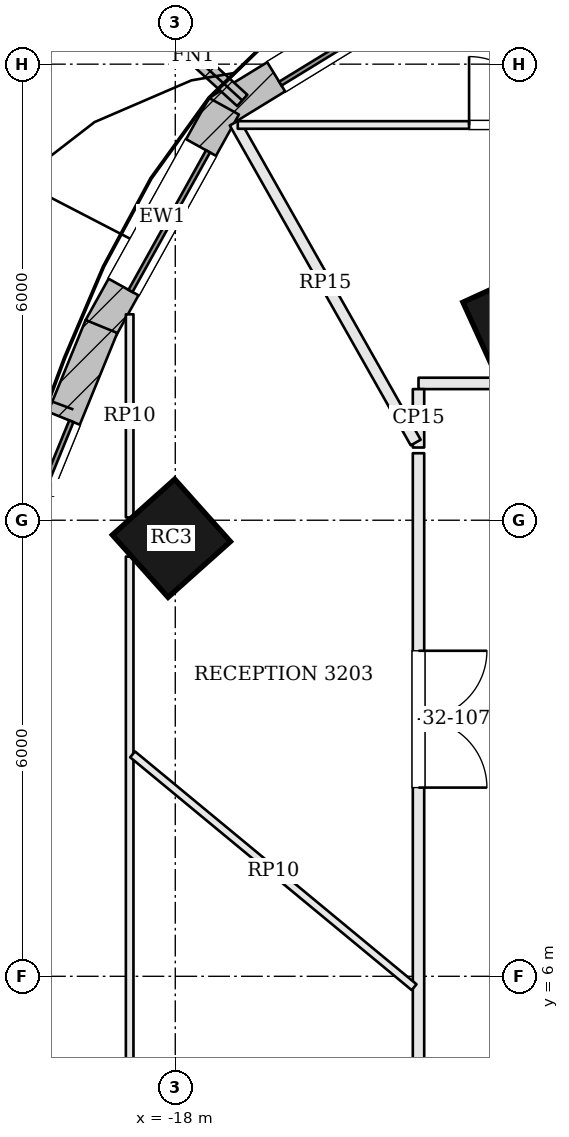
"""IFC4 building model, lengths in metres.
Left out: names, types, materials, properties, quantities, classifications, styles, units other than length and angle.
Written with IfcOpenShell. Run it as: python <this file> out.ifc"""

import sys

from ifc_helpers import new_model, si_unit, direction, frame, frame_2d, origin, origin_2d, place, context, subcontext, project, spatial, rectangle, extrude, element, fill, save


model = new_model("IFC4")
c1 = context("Model", 3, precision=1e-05, world=origin(), true_north=direction((0.0, 1.0)))
c2 = subcontext(c1, "Body", "Model", "MODEL_VIEW")
j1 = project(units=[si_unit("LENGTHUNIT", "METRE"), si_unit("PLANEANGLEUNIT", "RADIAN")], contexts=[c1])
p1 = place(None, origin())
s1 = spatial("IfcSite", under=j1, at=p1, CompositionType="ELEMENT")
p2 = place(p1, origin())
s2 = spatial("IfcBuilding", under=s1, at=p2, CompositionType="ELEMENT")
p3 = place(p2, frame((0.0, 0.0, 134.4)))
s3 = spatial("IfcBuildingStorey", under=s2, at=p3, CompositionType="ELEMENT", Elevation=134.4)
for number, where, z_axis, x_axis in (
    (1, (-13.487, 14.596, 0.0), (0.0, 0.0, 1.0), (-0.91, -0.415, 0.0)),
    (2, (-18.051, 11.763, 0.0), (0.0, 0.0, 1.0), (-0.746, -0.666, 0.0)),
):
    element("IfcColumn", number, at=place(p3, frame(where, z_axis=z_axis, x_axis=x_axis)), inside=s3, PredefinedType="COLUMN", context=c2, shape_type="SweptSolid", body=[
        extrude(rectangle(XDim=1.1, YDim=1.1, at=origin_2d()), origin(), (0.0, 0.0, 1.0), 3.9),
    ])
p4 = place(p3, frame((-14.116, 19.4, 0.0), z_axis=(0.0, 0.0, 1.0), x_axis=(-0.852622865325, -0.522526793117, 0.0)))
e3 = element("IfcWall", 3, at=p4, inside=s3, PredefinedType="SOLIDWALL", context=c2, shape_type="SweptSolid", body=[
    extrude(rectangle(XDim=3.896, YDim=0.45, at=frame_2d((1.948, 0.0))), origin(), (0.0, 0.0, 1.0), 3.7),
])
p5 = place(p4, frame((0.898, 0.0, 0.9)))
e4 = element("IfcOpeningElement", 4, at=p5, cuts=e3, PredefinedType="OPENING", context=c2, shape_type="SweptSolid", body=[
    extrude(rectangle(XDim=2.1, YDim=2.3, at=frame_2d((1.05, 1.15))), frame((0.0, 0.235, 0.0), z_axis=(0.0, -1.0, 0.0), x_axis=(1.0, 0.0, 0.0)), (0.0, 0.0, 1.0), 0.47),
])
p6 = place(p3, frame((-17.359, 17.447, 0.0), z_axis=(0.0, 0.0, 1.0), x_axis=(-0.485618126214, -0.874171056197, 0.0)))
e5 = element("IfcWall", 5, at=p6, inside=s3, PredefinedType="SOLIDWALL", context=c2, shape_type="SweptSolid", body=[
    extrude(rectangle(XDim=3.343, YDim=0.45, at=frame_2d((1.671, 0.0))), origin(), (0.0, 0.0, 1.0), 3.7),
])
p7 = place(p6, frame((0.621, 0.0, 0.9)))
e6 = element("IfcOpeningElement", 6, at=p7, cuts=e5, PredefinedType="OPENING", context=c2, shape_type="SweptSolid", body=[
    extrude(rectangle(XDim=2.1, YDim=2.3, at=frame_2d((1.05, 1.15))), frame((0.0, 0.235, 0.0), z_axis=(0.0, -1.0, 0.0), x_axis=(1.0, 0.0, 0.0)), (0.0, 0.0, 1.0), 0.47),
])
p8 = place(p3, frame((-18.971, 14.549, 0.0), z_axis=(0.0, 0.0, 1.0), x_axis=(-0.378434936431, -0.925627894398, 0.0)))
e7 = element("IfcWall", 7, at=p8, inside=s3, PredefinedType="SOLIDWALL", context=c2, shape_type="SweptSolid", body=[
    extrude(rectangle(XDim=4.708, YDim=0.45, at=frame_2d((2.354, 0.0))), origin(), (0.0, 0.0, 1.0), 3.7),
])
p9 = place(p8, frame((1.304, 0.0, 0.9)))
e8 = element("IfcOpeningElement", 8, at=p9, cuts=e7, PredefinedType="OPENING", context=c2, shape_type="SweptSolid", body=[
    extrude(rectangle(XDim=2.1, YDim=2.3, at=frame_2d((1.05, 1.15))), frame((0.0, 0.235, 0.0), z_axis=(0.0, -1.0, 0.0), x_axis=(1.0, 0.0, 0.0)), (0.0, 0.0, 1.0), 0.47),
])
p10 = place(p3, frame((-17.119, 17.523, 0.0), z_axis=(0.0, 0.0, 1.0), x_axis=(-0.737866019047, 0.674947211221, 0.0)))
e9 = element("IfcWall", 9, at=p10, inside=s3, PredefinedType="SOLIDWALL", context=c2, shape_type="SweptSolid", body=[
    extrude(rectangle(XDim=1.75, YDim=0.2, at=frame_2d((0.875, 0.0))), origin(), (0.0, 0.0, 1.0), 3.7),
])
p11 = place(p3, frame((3.012, 13.8, 0.0), z_axis=(0.0, 0.0, 1.0), x_axis=(-1.0, 0.0, 0.0)))
e10 = element("IfcWall", 10, at=p11, inside=s3, PredefinedType="PARTITIONING", context=c2, shape_type="SweptSolid", body=[
    extrude(rectangle(XDim=17.812, YDim=0.15, at=frame_2d((8.906, 0.0))), origin(), (0.0, 0.0, 1.0), 3.198),
])
p12 = place(p11, frame((3.342, 0.0, 0.0)))
e11 = element("IfcOpeningElement", 11, at=p12, cuts=e10, PredefinedType="OPENING", context=c2, shape_type="SweptSolid", body=[
    extrude(rectangle(XDim=1.8, YDim=2.1, at=frame_2d((0.9, 1.05))), frame((0.0, 0.085, 0.0), z_axis=(0.0, -1.0, 0.0), x_axis=(1.0, 0.0, 0.0)), (0.0, 0.0, 1.0), 0.17),
])
p13 = place(p11, frame((9.659, 0.0, 0.0)))
e12 = element("IfcOpeningElement", 12, at=p13, cuts=e10, PredefinedType="OPENING", context=c2, shape_type="SweptSolid", body=[
    extrude(rectangle(XDim=1.0, YDim=2.4, at=frame_2d((0.5, 1.2))), frame((0.0, 0.085, 0.0), z_axis=(0.0, -1.0, 0.0), x_axis=(1.0, 0.0, 0.0)), (0.0, 0.0, 1.0), 0.17),
])
p14 = place(p11, frame((14.25, 0.0, 0.0)))
e13 = element("IfcOpeningElement", 13, at=p14, cuts=e10, PredefinedType="OPENING", context=c2, shape_type="SweptSolid", body=[
    extrude(rectangle(XDim=1.0, YDim=2.1, at=frame_2d((0.5, 1.05))), frame((0.0, 0.085, 0.0), z_axis=(0.0, -1.0, 0.0), x_axis=(1.0, 0.0, 0.0)), (0.0, 0.0, 1.0), 0.17),
])
p15 = place(p3, frame((-14.8, 13.725, 0.0), z_axis=(0.0, 0.0, 1.0), x_axis=(0.0, -1.0, 0.0)))
e14 = element("IfcWall", 14, at=p15, inside=s3, PredefinedType="PARTITIONING", context=c2, shape_type="SweptSolid", body=[
    extrude(rectangle(XDim=0.769, YDim=0.15, at=frame_2d((0.384, 0.0))), origin(), (0.0, 0.0, 1.0), 3.198),
])
p16 = place(p3, frame((-17.218, 17.23, 0.0), z_axis=(0.0, 0.0, 1.0), x_axis=(0.492436580725, -0.870348329098, 0.0)))
e15 = element("IfcWall", 15, at=p16, inside=s3, PredefinedType="PARTITIONING", context=c2, shape_type="SweptSolid", body=[
    extrude(rectangle(XDim=4.835, YDim=0.15, at=frame_2d((2.417, 0.0))), origin(), (0.0, 0.0, 1.0), 3.198),
])
p17 = place(p3, frame((-14.8, 12.882, 0.0), z_axis=(0.0, 0.0, 1.0), x_axis=(0.0, -1.0, 0.0)))
e16 = element("IfcWall", 16, at=p17, inside=s3, PredefinedType="PARTITIONING", context=c2, shape_type="SweptSolid", body=[
    extrude(rectangle(XDim=16.652, YDim=0.15, at=frame_2d((8.326, 0.0))), origin(), (0.0, 0.0, 1.0), 3.198),
])
p18 = place(p17, frame((2.599, 0.0, 0.0)))
e17 = element("IfcOpeningElement", 17, at=p18, cuts=e16, PredefinedType="OPENING", context=c2, shape_type="SweptSolid", body=[
    extrude(rectangle(XDim=1.8, YDim=2.1, at=frame_2d((0.9, 1.05))), frame((0.0, 0.085, 0.0), z_axis=(0.0, -1.0, 0.0), x_axis=(1.0, 0.0, 0.0)), (0.0, 0.0, 1.0), 0.17),
])
p19 = place(p17, frame((9.456, 0.0, 0.0)))
e18 = element("IfcOpeningElement", 18, at=p19, cuts=e16, PredefinedType="OPENING", context=c2, shape_type="SweptSolid", body=[
    extrude(rectangle(XDim=1.0, YDim=2.4, at=frame_2d((0.5, 1.2))), frame((0.0, 0.085, 0.0), z_axis=(0.0, -1.0, 0.0), x_axis=(1.0, 0.0, 0.0)), (0.0, 0.0, 1.0), 0.17),
])
p20 = place(p17, frame((14.15, 0.0, 0.0)))
e19 = element("IfcOpeningElement", 19, at=p20, cuts=e16, PredefinedType="OPENING", context=c2, shape_type="SweptSolid", body=[
    extrude(rectangle(XDim=1.0, YDim=2.1, at=frame_2d((0.5, 1.05))), frame((0.0, 0.085, 0.0), z_axis=(0.0, -1.0, 0.0), x_axis=(1.0, 0.0, 0.0)), (0.0, 0.0, 1.0), 0.17),
])
p21 = place(p3, frame((-17.178, 17.2, 0.0), z_axis=(0.0, 0.0, 1.0), x_axis=(1.0, 0.0, 0.0)))
e20 = element("IfcWall", 20, at=p21, inside=s3, PredefinedType="PARTITIONING", context=c2, shape_type="SweptSolid", body=[
    extrude(rectangle(XDim=13.585, YDim=0.1, at=frame_2d((6.792, 0.0))), origin(), (0.0, 0.0, 1.0), 3.184),
])
p22 = place(p21, frame((3.043, 0.0, 0.0)))
e21 = element("IfcOpeningElement", 21, at=p22, cuts=e20, PredefinedType="OPENING", context=c2, shape_type="SweptSolid", body=[
    extrude(rectangle(XDim=0.9, YDim=2.1, at=frame_2d((0.45, 1.05))), frame((0.0, 0.06, 0.0), z_axis=(0.0, -1.0, 0.0), x_axis=(1.0, 0.0, 0.0)), (0.0, 0.0, 1.0), 0.12),
])
p23 = place(p3, frame((-18.6, -5.397, 0.0), z_axis=(0.0, 0.0, 1.0), x_axis=(0.0, 1.0, 0.0)))
e22 = element("IfcWall", 22, at=p23, inside=s3, PredefinedType="PARTITIONING", context=c2, shape_type="SweptSolid", body=[
    extrude(rectangle(XDim=16.919, YDim=0.1, at=frame_2d((8.459, 0.0))), origin(), (0.0, 0.0, 1.0), 3.184),
])
p24 = place(p23, frame((1.975, 0.0, 0.0)))
e23 = element("IfcOpeningElement", 23, at=p24, cuts=e22, PredefinedType="OPENING", context=c2, shape_type="SweptSolid", body=[
    extrude(rectangle(XDim=0.9, YDim=2.1, at=frame_2d((0.45, 1.05))), frame((0.0, 0.06, 0.0), z_axis=(0.0, -1.0, 0.0), x_axis=(1.0, 0.0, 0.0)), (0.0, 0.0, 1.0), 0.12),
])
p25 = place(p23, frame((7.95, 0.0, 0.0)))
e24 = element("IfcOpeningElement", 24, at=p25, cuts=e22, PredefinedType="OPENING", context=c2, shape_type="SweptSolid", body=[
    extrude(rectangle(XDim=1.0, YDim=2.4, at=frame_2d((0.5, 1.2))), frame((0.0, 0.06, 0.0), z_axis=(0.0, -1.0, 0.0), x_axis=(1.0, 0.0, 0.0)), (0.0, 0.0, 1.0), 0.12),
])
p26 = place(p3, frame((-18.6, 12.037, 0.0), z_axis=(0.0, 0.0, 1.0), x_axis=(0.0, 1.0, 0.0)))
e25 = element("IfcWall", 25, at=p26, inside=s3, PredefinedType="PARTITIONING", context=c2, shape_type="SweptSolid", body=[
    extrude(rectangle(XDim=2.672, YDim=0.1, at=frame_2d((1.336, 0.0))), origin(), (0.0, 0.0, 1.0), 3.184),
])
p27 = place(p3, frame((-14.858, 5.857, 0.0), z_axis=(0.0, 0.0, 1.0), x_axis=(-0.770605931108, 0.637311932213, 0.0)))
e26 = element("IfcWall", 26, at=p27, inside=s3, PredefinedType="PARTITIONING", context=c2, shape_type="SweptSolid", body=[
    extrude(rectangle(XDim=4.806, YDim=0.1, at=frame_2d((2.403, 0.0))), origin(), (0.0, 0.0, 1.0), 3.184),
])
p28 = place(p5, origin())
e27 = element("IfcWindow", 27, at=p28, inside=s3, PartitioningType="SINGLE_PANEL", PredefinedType="WINDOW", context=c2, shape_type="SweptSolid", body=[
    extrude(rectangle(XDim=2.1, YDim=2.3, at=frame_2d((1.05, 1.15))), frame((0.0, 0.135, 0.0), z_axis=(0.0, -1.0, 0.0), x_axis=(1.0, 0.0, 0.0)), (0.0, 0.0, 1.0), 0.06),
])
fill(e4, e27)
p29 = place(p7, origin())
e28 = element("IfcWindow", 28, at=p29, inside=s3, PartitioningType="SINGLE_PANEL", PredefinedType="WINDOW", context=c2, shape_type="SweptSolid", body=[
    extrude(rectangle(XDim=2.1, YDim=2.3, at=frame_2d((1.05, 1.15))), frame((0.0, 0.135, 0.0), z_axis=(0.0, -1.0, 0.0), x_axis=(1.0, 0.0, 0.0)), (0.0, 0.0, 1.0), 0.06),
])
fill(e6, e28)
p30 = place(p9, origin())
e29 = element("IfcWindow", 29, at=p30, inside=s3, PartitioningType="SINGLE_PANEL", PredefinedType="WINDOW", context=c2, shape_type="SweptSolid", body=[
    extrude(rectangle(XDim=2.1, YDim=2.3, at=frame_2d((1.05, 1.15))), frame((0.0, 0.135, 0.0), z_axis=(0.0, -1.0, 0.0), x_axis=(1.0, 0.0, 0.0)), (0.0, 0.0, 1.0), 0.06),
])
fill(e8, e29)
p31 = place(p22, origin())
e30 = element("IfcDoor", 30, at=p31, inside=s3, OperationType="SINGLE_SWING_LEFT", PredefinedType="DOOR", context=c2, shape_type="SweptSolid", body=[
    extrude(rectangle(XDim=0.9, YDim=2.1, at=frame_2d((0.45, 1.05))), frame((0.0, 0.025, 0.0), z_axis=(0.0, -1.0, 0.0), x_axis=(1.0, 0.0, 0.0)), (0.0, 0.0, 1.0), 0.05),
])
fill(e21, e30)
p32 = place(p18, origin())
e31 = element("IfcDoor", 31, at=p32, inside=s3, OperationType="DOUBLE_DOOR_SINGLE_SWING", PredefinedType="DOOR", context=c2, shape_type="SweptSolid", body=[
    extrude(rectangle(XDim=1.8, YDim=2.1, at=frame_2d((0.9, 1.05))), frame((0.0, 0.025, 0.0), z_axis=(0.0, -1.0, 0.0), x_axis=(1.0, 0.0, 0.0)), (0.0, 0.0, 1.0), 0.05),
])
fill(e17, e31)
save(model, sys.argv[1])
